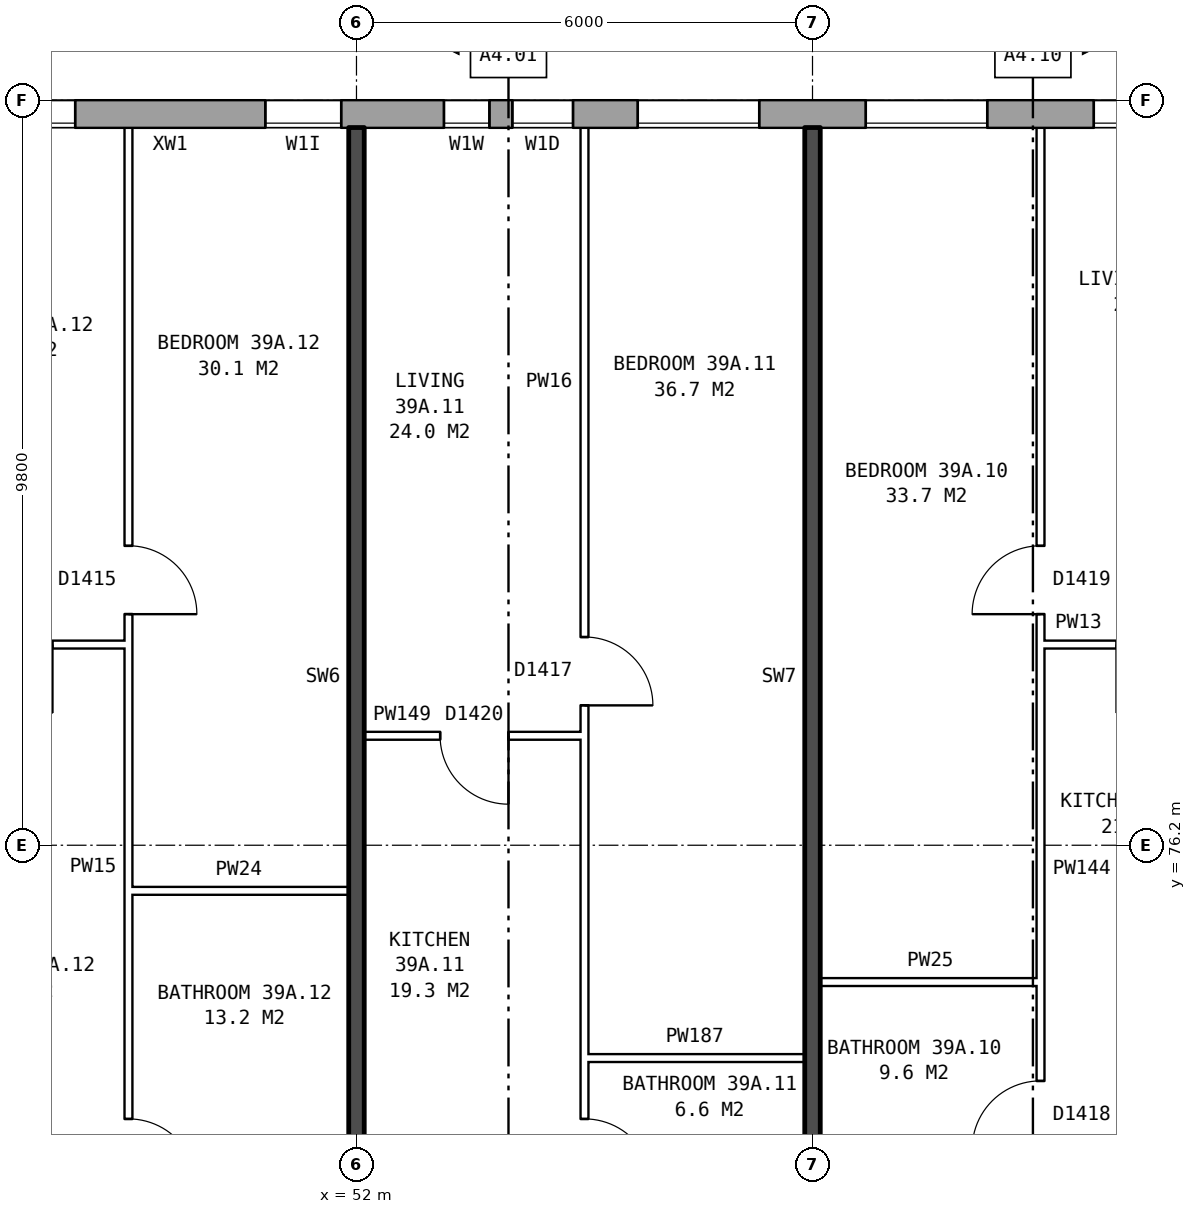
"""IFC4 building model, lengths in metres.
Left out: names, types, materials, properties, quantities, classifications, styles, units other than length and angle.
Written with IfcOpenShell. Run it as: python <this file> out.ifc"""

import sys

from ifc_helpers import new_model, si_unit, direction, frame, frame_2d, origin, place, context, subcontext, project, spatial, rectangle, extrude, element, fill, save


model = new_model("IFC4")
c1 = context("Model", 3, precision=1e-05, world=origin(), true_north=direction((0.0, 1.0)))
c2 = subcontext(c1, "Body", "Model", "MODEL_VIEW")
j1 = project(units=[si_unit("LENGTHUNIT", "METRE"), si_unit("PLANEANGLEUNIT", "RADIAN")], contexts=[c1])
p1 = place(None, origin())
s1 = spatial("IfcSite", under=j1, at=p1, CompositionType="ELEMENT")
p2 = place(p1, origin())
s2 = spatial("IfcBuilding", under=s1, at=p2, CompositionType="ELEMENT")
p3 = place(p2, frame((0.0, 0.0, 139.2)))
s3 = spatial("IfcBuildingStorey", under=s2, at=p3, CompositionType="ELEMENT", Elevation=139.2)
p4 = place(p3, frame((72.925, 85.82, 0.0), z_axis=(0.0, 0.0, 1.0), x_axis=(-1.0, 0.0, 0.0)))
e1 = element("IfcWall", 1, at=p4, inside=s3, PredefinedType="STANDARD", context=c2, shape_type="SweptSolid", body=[
    extrude(rectangle(XDim=43.101, YDim=0.36, at=frame_2d((21.55, 0.0))), origin(), (0.0, 0.0, 1.0), 2.85),
])
p5 = place(p4, frame((0.625, 0.0, 0.8)))
e2 = element("IfcOpeningElement", 2, at=p5, cuts=e1, PredefinedType="OPENING", context=c2, shape_type="SweptSolid", body=[
    extrude(rectangle(XDim=1.6, YDim=1.8, at=frame_2d((0.8, 0.9))), frame((0.0, 0.19, 0.0), z_axis=(0.0, -1.0, 0.0), x_axis=(1.0, 0.0, 0.0)), (0.0, 0.0, 1.0), 0.38),
])
p6 = place(p4, frame((3.625, 0.0, 0.8)))
e3 = element("IfcOpeningElement", 3, at=p6, cuts=e1, PredefinedType="OPENING", context=c2, shape_type="SweptSolid", body=[
    extrude(rectangle(XDim=1.6, YDim=1.8, at=frame_2d((0.8, 0.9))), frame((0.0, 0.19, 0.0), z_axis=(0.0, -1.0, 0.0), x_axis=(1.0, 0.0, 0.0)), (0.0, 0.0, 1.0), 0.38),
])
p7 = place(p4, frame((6.625, 0.0, 0.8)))
e4 = element("IfcOpeningElement", 4, at=p7, cuts=e1, PredefinedType="OPENING", context=c2, shape_type="SweptSolid", body=[
    extrude(rectangle(XDim=1.6, YDim=1.8, at=frame_2d((0.8, 0.9))), frame((0.0, 0.19, 0.0), z_axis=(0.0, -1.0, 0.0), x_axis=(1.0, 0.0, 0.0)), (0.0, 0.0, 1.0), 0.38),
])
p8 = place(p4, frame((9.625, 0.0, 0.8)))
e5 = element("IfcOpeningElement", 5, at=p8, cuts=e1, PredefinedType="OPENING", context=c2, shape_type="SweptSolid", body=[
    extrude(rectangle(XDim=1.6, YDim=1.8, at=frame_2d((0.8, 0.9))), frame((0.0, 0.19, 0.0), z_axis=(0.0, -1.0, 0.0), x_axis=(1.0, 0.0, 0.0)), (0.0, 0.0, 1.0), 0.38),
])
p9 = place(p4, frame((12.625, 0.0, 0.8)))
e6 = element("IfcOpeningElement", 6, at=p9, cuts=e1, PredefinedType="OPENING", context=c2, shape_type="SweptSolid", body=[
    extrude(rectangle(XDim=1.6, YDim=1.8, at=frame_2d((0.8, 0.9))), frame((0.0, 0.19, 0.0), z_axis=(0.0, -1.0, 0.0), x_axis=(1.0, 0.0, 0.0)), (0.0, 0.0, 1.0), 0.38),
])
p10 = place(p4, frame((15.625, 0.0, 0.8)))
e7 = element("IfcOpeningElement", 7, at=p10, cuts=e1, PredefinedType="OPENING", context=c2, shape_type="SweptSolid", body=[
    extrude(rectangle(XDim=1.6, YDim=1.8, at=frame_2d((0.8, 0.9))), frame((0.0, 0.19, 0.0), z_axis=(0.0, -1.0, 0.0), x_axis=(1.0, 0.0, 0.0)), (0.0, 0.0, 1.0), 0.38),
])
p11 = place(p4, frame((18.075, 0.0, 0.8)))
e8 = element("IfcOpeningElement", 8, at=p11, cuts=e1, PredefinedType="OPENING", context=c2, shape_type="SweptSolid", body=[
    extrude(rectangle(XDim=0.8, YDim=1.8, at=frame_2d((0.4, 0.9))), frame((0.0, 0.19, 0.0), z_axis=(0.0, -1.0, 0.0), x_axis=(1.0, 0.0, 0.0)), (0.0, 0.0, 1.0), 0.38),
])
p12 = place(p4, frame((21.125, 0.0, 0.15)))
e9 = element("IfcOpeningElement", 9, at=p12, cuts=e1, PredefinedType="OPENING", context=c2, shape_type="SweptSolid", body=[
    extrude(rectangle(XDim=1.0, YDim=1.5, at=frame_2d((0.5, 0.75))), frame((0.0, 0.19, 0.0), z_axis=(0.0, -1.0, 0.0), x_axis=(1.0, 0.0, 0.0)), (0.0, 0.0, 1.0), 0.38),
])
p13 = place(p4, frame((24.625, 0.0, 0.8)))
e10 = element("IfcOpeningElement", 10, at=p13, cuts=e1, PredefinedType="OPENING", context=c2, shape_type="SweptSolid", body=[
    extrude(rectangle(XDim=1.6, YDim=1.8, at=frame_2d((0.8, 0.9))), frame((0.0, 0.19, 0.0), z_axis=(0.0, -1.0, 0.0), x_axis=(1.0, 0.0, 0.0)), (0.0, 0.0, 1.0), 0.38),
])
p14 = place(p4, frame((27.625, 0.0, 0.8)))
e11 = element("IfcOpeningElement", 11, at=p14, cuts=e1, PredefinedType="OPENING", context=c2, shape_type="SweptSolid", body=[
    extrude(rectangle(XDim=1.6, YDim=1.8, at=frame_2d((0.8, 0.9))), frame((0.0, 0.19, 0.0), z_axis=(0.0, -1.0, 0.0), x_axis=(1.0, 0.0, 0.0)), (0.0, 0.0, 1.0), 0.38),
])
p15 = place(p4, frame((30.625, 0.0, 0.8)))
e12 = element("IfcOpeningElement", 12, at=p15, cuts=e1, PredefinedType="OPENING", context=c2, shape_type="SweptSolid", body=[
    extrude(rectangle(XDim=1.6, YDim=1.8, at=frame_2d((0.8, 0.9))), frame((0.0, 0.19, 0.0), z_axis=(0.0, -1.0, 0.0), x_axis=(1.0, 0.0, 0.0)), (0.0, 0.0, 1.0), 0.38),
])
p16 = place(p4, frame((33.625, 0.0, 0.8)))
e13 = element("IfcOpeningElement", 13, at=p16, cuts=e1, PredefinedType="OPENING", context=c2, shape_type="SweptSolid", body=[
    extrude(rectangle(XDim=1.6, YDim=1.8, at=frame_2d((0.8, 0.9))), frame((0.0, 0.19, 0.0), z_axis=(0.0, -1.0, 0.0), x_axis=(1.0, 0.0, 0.0)), (0.0, 0.0, 1.0), 0.38),
])
p17 = place(p4, frame((36.625, 0.0, 0.8)))
e14 = element("IfcOpeningElement", 14, at=p17, cuts=e1, PredefinedType="OPENING", context=c2, shape_type="SweptSolid", body=[
    extrude(rectangle(XDim=1.6, YDim=1.8, at=frame_2d((0.8, 0.9))), frame((0.0, 0.19, 0.0), z_axis=(0.0, -1.0, 0.0), x_axis=(1.0, 0.0, 0.0)), (0.0, 0.0, 1.0), 0.38),
])
p18 = place(p4, frame((39.625, 0.0, 0.8)))
e15 = element("IfcOpeningElement", 15, at=p18, cuts=e1, PredefinedType="OPENING", context=c2, shape_type="SweptSolid", body=[
    extrude(rectangle(XDim=1.6, YDim=1.8, at=frame_2d((0.8, 0.9))), frame((0.0, 0.19, 0.0), z_axis=(0.0, -1.0, 0.0), x_axis=(1.0, 0.0, 0.0)), (0.0, 0.0, 1.0), 0.38),
])
p19 = place(p4, frame((19.175, 0.0, 1.6)))
e16 = element("IfcOpeningElement", 16, at=p19, cuts=e1, PredefinedType="OPENING", context=c2, shape_type="SweptSolid", body=[
    extrude(rectangle(XDim=0.6, YDim=0.9, at=frame_2d((0.3, 0.45))), frame((0.0, 0.19, 0.0), z_axis=(0.0, -1.0, 0.0), x_axis=(1.0, 0.0, 0.0)), (0.0, 0.0, 1.0), 0.38),
])
for number, where, z_axis, x_axis in (
    (17, (55.0, 73.4, 0.0), (0.0, 0.0, 1.0), (1.0, 0.0, 0.0)),
    (18, (58.1, 74.4, 0.0), (0.0, 0.0, 1.0), (1.0, 0.0, 0.0)),
    (19, (49.0, 75.6, 0.0), (0.0, 0.0, 1.0), (1.0, 0.0, 0.0)),
):
    element("IfcWall", number, at=place(p3, frame(where, z_axis=z_axis, x_axis=x_axis)), inside=s3, PredefinedType="PARTITIONING", context=c2, shape_type="SweptSolid", body=[
        extrude(rectangle(XDim=2.9, YDim=0.1, at=frame_2d((1.45, 0.0))), origin(), (0.0, 0.0, 1.0), 2.85),
    ])
p20 = place(p3, frame((52.1, 77.64, 0.0), z_axis=(0.0, 0.0, 1.0), x_axis=(1.0, 0.0, 0.0)))
e20 = element("IfcWall", 20, at=p20, inside=s3, PredefinedType="PARTITIONING", context=c2, shape_type="SweptSolid", body=[
    extrude(rectangle(XDim=2.9, YDim=0.1, at=frame_2d((1.45, 0.0))), origin(), (0.0, 0.0, 1.0), 2.85),
])
p21 = place(p20, frame((1.0, 0.0, 0.0)))
e21 = element("IfcOpeningElement", 21, at=p21, cuts=e20, PredefinedType="OPENING", context=c2, shape_type="SweptSolid", body=[
    extrude(rectangle(XDim=0.9, YDim=2.1, at=frame_2d((0.45, 1.05))), frame((0.0, 0.06, 0.0), z_axis=(0.0, -1.0, 0.0), x_axis=(1.0, 0.0, 0.0)), (0.0, 0.0, 1.0), 0.12),
])
p22 = place(p3, frame((46.1, 78.84, 0.0), z_axis=(0.0, 0.0, 1.0), x_axis=(1.0, 0.0, 0.0)))
e22 = element("IfcWall", 22, at=p22, inside=s3, PredefinedType="PARTITIONING", context=c2, shape_type="SweptSolid", body=[
    extrude(rectangle(XDim=2.9, YDim=0.1, at=frame_2d((1.45, 0.0))), origin(), (0.0, 0.0, 1.0), 2.85),
])
p23 = place(p22, frame((1.0, 0.0, 0.0)))
e23 = element("IfcOpeningElement", 23, at=p23, cuts=e22, PredefinedType="OPENING", context=c2, shape_type="SweptSolid", body=[
    extrude(rectangle(XDim=0.9, YDim=2.1, at=frame_2d((0.45, 1.05))), frame((0.0, 0.06, 0.0), z_axis=(0.0, -1.0, 0.0), x_axis=(1.0, 0.0, 0.0)), (0.0, 0.0, 1.0), 0.12),
])
p24 = place(p3, frame((61.0, 78.84, 0.0), z_axis=(0.0, 0.0, 1.0), x_axis=(1.0, 0.0, 0.0)))
e24 = element("IfcWall", 24, at=p24, inside=s3, PredefinedType="PARTITIONING", context=c2, shape_type="SweptSolid", body=[
    extrude(rectangle(XDim=2.9, YDim=0.1, at=frame_2d((1.45, 0.0))), origin(), (0.0, 0.0, 1.0), 2.85),
])
p25 = place(p24, frame((1.0, 0.0, 0.0)))
e25 = element("IfcOpeningElement", 25, at=p25, cuts=e24, PredefinedType="OPENING", context=c2, shape_type="SweptSolid", body=[
    extrude(rectangle(XDim=0.9, YDim=2.1, at=frame_2d((0.45, 1.05))), frame((0.0, 0.06, 0.0), z_axis=(0.0, -1.0, 0.0), x_axis=(1.0, 0.0, 0.0)), (0.0, 0.0, 1.0), 0.12),
])
p26 = place(p3, frame((49.0, 71.3, 0.0), z_axis=(0.0, 0.0, 1.0), x_axis=(0.0, 1.0, 0.0)))
e26 = element("IfcWall", 26, at=p26, inside=s3, PredefinedType="PARTITIONING", context=c2, shape_type="SweptSolid", body=[
    extrude(rectangle(XDim=14.34, YDim=0.1, at=frame_2d((7.17, 0.0))), origin(), (0.0, 0.0, 1.0), 2.85),
])
p27 = place(p26, frame((7.94, 0.0, 0.0)))
e27 = element("IfcOpeningElement", 27, at=p27, cuts=e26, PredefinedType="OPENING", context=c2, shape_type="SweptSolid", body=[
    extrude(rectangle(XDim=0.9, YDim=2.1, at=frame_2d((0.45, 1.05))), frame((0.0, 0.06, 0.0), z_axis=(0.0, -1.0, 0.0), x_axis=(1.0, 0.0, 0.0)), (0.0, 0.0, 1.0), 0.12),
])
p28 = place(p26, frame((0.4, 0.0, 0.0)))
e28 = element("IfcOpeningElement", 28, at=p28, cuts=e26, PredefinedType="OPENING", context=c2, shape_type="SweptSolid", body=[
    extrude(rectangle(XDim=0.9, YDim=2.1, at=frame_2d((0.45, 1.05))), frame((0.0, 0.06, 0.0), z_axis=(0.0, -1.0, 0.0), x_axis=(1.0, 0.0, 0.0)), (0.0, 0.0, 1.0), 0.12),
])
p29 = place(p3, frame((52.0, 71.2, 0.0), z_axis=(0.0, 0.0, 1.0), x_axis=(0.0, 1.0, 0.0)))
e29 = element("IfcWall", 29, at=p29, inside=s3, PredefinedType="SOLIDWALL", context=c2, shape_type="SweptSolid", body=[
    extrude(rectangle(XDim=14.44, YDim=0.2, at=frame_2d((7.22, 0.0))), origin(), (0.0, 0.0, 1.0), 2.85),
])
p30 = place(p3, frame((55.0, 71.3, 0.0), z_axis=(0.0, 0.0, 1.0), x_axis=(0.0, 1.0, 0.0)))
e30 = element("IfcWall", 30, at=p30, inside=s3, PredefinedType="PARTITIONING", context=c2, shape_type="SweptSolid", body=[
    extrude(rectangle(XDim=14.34, YDim=0.1, at=frame_2d((7.17, 0.0))), origin(), (0.0, 0.0, 1.0), 2.85),
])
p31 = place(p30, frame((6.74, 0.0, 0.0)))
e31 = element("IfcOpeningElement", 31, at=p31, cuts=e30, PredefinedType="OPENING", context=c2, shape_type="SweptSolid", body=[
    extrude(rectangle(XDim=0.9, YDim=2.1, at=frame_2d((0.45, 1.05))), frame((0.0, 0.06, 0.0), z_axis=(0.0, -1.0, 0.0), x_axis=(1.0, 0.0, 0.0)), (0.0, 0.0, 1.0), 0.12),
])
p32 = place(p30, frame((0.4, 0.0, 0.0)))
e32 = element("IfcOpeningElement", 32, at=p32, cuts=e30, PredefinedType="OPENING", context=c2, shape_type="SweptSolid", body=[
    extrude(rectangle(XDim=0.9, YDim=2.1, at=frame_2d((0.45, 1.05))), frame((0.0, 0.06, 0.0), z_axis=(0.0, -1.0, 0.0), x_axis=(1.0, 0.0, 0.0)), (0.0, 0.0, 1.0), 0.12),
])
p33 = place(p3, frame((58.0, 71.2, 0.0), z_axis=(0.0, 0.0, 1.0), x_axis=(0.0, 1.0, 0.0)))
e33 = element("IfcWall", 33, at=p33, inside=s3, PredefinedType="SOLIDWALL", context=c2, shape_type="SweptSolid", body=[
    extrude(rectangle(XDim=14.44, YDim=0.2, at=frame_2d((7.22, 0.0))), origin(), (0.0, 0.0, 1.0), 2.85),
])
p34 = place(p3, frame((61.0, 71.3, 0.0), z_axis=(0.0, 0.0, 1.0), x_axis=(0.0, 1.0, 0.0)))
e34 = element("IfcWall", 34, at=p34, inside=s3, PredefinedType="PARTITIONING", context=c2, shape_type="SweptSolid", body=[
    extrude(rectangle(XDim=14.34, YDim=0.1, at=frame_2d((7.17, 0.0))), origin(), (0.0, 0.0, 1.0), 2.85),
])
p35 = place(p34, frame((7.94, 0.0, 0.0)))
e35 = element("IfcOpeningElement", 35, at=p35, cuts=e34, PredefinedType="OPENING", context=c2, shape_type="SweptSolid", body=[
    extrude(rectangle(XDim=0.9, YDim=2.1, at=frame_2d((0.45, 1.05))), frame((0.0, 0.06, 0.0), z_axis=(0.0, -1.0, 0.0), x_axis=(1.0, 0.0, 0.0)), (0.0, 0.0, 1.0), 0.12),
])
p36 = place(p34, frame((0.9, 0.0, 0.0)))
e36 = element("IfcOpeningElement", 36, at=p36, cuts=e34, PredefinedType="OPENING", context=c2, shape_type="SweptSolid", body=[
    extrude(rectangle(XDim=0.9, YDim=2.1, at=frame_2d((0.45, 1.05))), frame((0.0, 0.06, 0.0), z_axis=(0.0, -1.0, 0.0), x_axis=(1.0, 0.0, 0.0)), (0.0, 0.0, 1.0), 0.12),
])
p37 = place(p8, origin())
e37 = element("IfcWindow", 37, at=p37, inside=s3, PartitioningType="SINGLE_PANEL", PredefinedType="WINDOW", context=c2, shape_type="SweptSolid", body=[
    extrude(rectangle(XDim=1.6, YDim=1.8, at=frame_2d((0.8, 0.9))), frame((0.0, 0.15, 0.0), z_axis=(0.0, -1.0, 0.0), x_axis=(1.0, 0.0, 0.0)), (0.0, 0.0, 1.0), 0.06),
])
fill(e5, e37)
p38 = place(p9, origin())
e38 = element("IfcWindow", 38, at=p38, inside=s3, PartitioningType="SINGLE_PANEL", PredefinedType="WINDOW", context=c2, shape_type="SweptSolid", body=[
    extrude(rectangle(XDim=1.6, YDim=1.8, at=frame_2d((0.8, 0.9))), frame((0.0, 0.15, 0.0), z_axis=(0.0, -1.0, 0.0), x_axis=(1.0, 0.0, 0.0)), (0.0, 0.0, 1.0), 0.06),
])
fill(e6, e38)
p39 = place(p10, origin())
e39 = element("IfcWindow", 39, at=p39, inside=s3, PartitioningType="SINGLE_PANEL", PredefinedType="WINDOW", context=c2, shape_type="SweptSolid", body=[
    extrude(rectangle(XDim=1.6, YDim=1.8, at=frame_2d((0.8, 0.9))), frame((0.0, 0.15, 0.0), z_axis=(0.0, -1.0, 0.0), x_axis=(1.0, 0.0, 0.0)), (0.0, 0.0, 1.0), 0.06),
])
fill(e7, e39)
p40 = place(p11, origin())
e40 = element("IfcWindow", 40, at=p40, inside=s3, PartitioningType="SINGLE_PANEL", PredefinedType="WINDOW", context=c2, shape_type="SweptSolid", body=[
    extrude(rectangle(XDim=0.8, YDim=1.8, at=frame_2d((0.4, 0.9))), frame((0.0, 0.15, 0.0), z_axis=(0.0, -1.0, 0.0), x_axis=(1.0, 0.0, 0.0)), (0.0, 0.0, 1.0), 0.06),
])
fill(e8, e40)
p41 = place(p12, origin())
e41 = element("IfcWindow", 41, at=p41, inside=s3, PartitioningType="SINGLE_PANEL", PredefinedType="WINDOW", context=c2, shape_type="SweptSolid", body=[
    extrude(rectangle(XDim=1.0, YDim=1.5, at=frame_2d((0.5, 0.75))), frame((0.0, 0.15, 0.0), z_axis=(0.0, -1.0, 0.0), x_axis=(1.0, 0.0, 0.0)), (0.0, 0.0, 1.0), 0.06),
])
fill(e9, e41)
p42 = place(p13, origin())
e42 = element("IfcWindow", 42, at=p42, inside=s3, PartitioningType="SINGLE_PANEL", PredefinedType="WINDOW", context=c2, shape_type="SweptSolid", body=[
    extrude(rectangle(XDim=1.6, YDim=1.8, at=frame_2d((0.8, 0.9))), frame((0.0, 0.15, 0.0), z_axis=(0.0, -1.0, 0.0), x_axis=(1.0, 0.0, 0.0)), (0.0, 0.0, 1.0), 0.06),
])
fill(e10, e42)
p43 = place(p35, origin())
e43 = element("IfcDoor", 43, at=p43, inside=s3, OperationType="SINGLE_SWING_LEFT", PredefinedType="DOOR", context=c2, shape_type="SweptSolid", body=[
    extrude(rectangle(XDim=0.9, YDim=2.1, at=frame_2d((0.45, 1.05))), frame((0.0, 0.025, 0.0), z_axis=(0.0, -1.0, 0.0), x_axis=(1.0, 0.0, 0.0)), (0.0, 0.0, 1.0), 0.05),
])
fill(e35, e43)
p44 = place(p36, origin())
e44 = element("IfcDoor", 44, at=p44, inside=s3, OperationType="SINGLE_SWING_LEFT", PredefinedType="DOOR", context=c2, shape_type="SweptSolid", body=[
    extrude(rectangle(XDim=0.9, YDim=2.1, at=frame_2d((0.45, 1.05))), frame((0.0, 0.025, 0.0), z_axis=(0.0, -1.0, 0.0), x_axis=(1.0, 0.0, 0.0)), (0.0, 0.0, 1.0), 0.05),
])
fill(e36, e44)
p45 = place(p31, frame((0.9, 0.0, 0.0), z_axis=(0.0, 0.0, 1.0), x_axis=(-1.0, 0.0, 0.0)))
e45 = element("IfcDoor", 45, at=p45, inside=s3, OperationType="SINGLE_SWING_RIGHT", PredefinedType="DOOR", context=c2, shape_type="SweptSolid", body=[
    extrude(rectangle(XDim=0.9, YDim=2.1, at=frame_2d((0.45, 1.05))), frame((0.0, 0.025, 0.0), z_axis=(0.0, -1.0, 0.0), x_axis=(1.0, 0.0, 0.0)), (0.0, 0.0, 1.0), 0.05),
])
fill(e31, e45)
p46 = place(p21, frame((0.9, 0.0, 0.0), z_axis=(0.0, 0.0, 1.0), x_axis=(-1.0, 0.0, 0.0)))
e46 = element("IfcDoor", 46, at=p46, inside=s3, OperationType="SINGLE_SWING_LEFT", PredefinedType="DOOR", context=c2, shape_type="SweptSolid", body=[
    extrude(rectangle(XDim=0.9, YDim=2.1, at=frame_2d((0.45, 1.05))), frame((0.0, 0.025, 0.0), z_axis=(0.0, -1.0, 0.0), x_axis=(1.0, 0.0, 0.0)), (0.0, 0.0, 1.0), 0.05),
])
fill(e21, e46)
p47 = place(p32, frame((0.9, 0.0, 0.0), z_axis=(0.0, 0.0, 1.0), x_axis=(-1.0, 0.0, 0.0)))
e47 = element("IfcDoor", 47, at=p47, inside=s3, OperationType="SINGLE_SWING_RIGHT", PredefinedType="DOOR", context=c2, shape_type="SweptSolid", body=[
    extrude(rectangle(XDim=0.9, YDim=2.1, at=frame_2d((0.45, 1.05))), frame((0.0, 0.025, 0.0), z_axis=(0.0, -1.0, 0.0), x_axis=(1.0, 0.0, 0.0)), (0.0, 0.0, 1.0), 0.05),
])
fill(e32, e47)
p48 = place(p27, frame((0.9, 0.0, 0.0), z_axis=(0.0, 0.0, 1.0), x_axis=(-1.0, 0.0, 0.0)))
e48 = element("IfcDoor", 48, at=p48, inside=s3, OperationType="SINGLE_SWING_RIGHT", PredefinedType="DOOR", context=c2, shape_type="SweptSolid", body=[
    extrude(rectangle(XDim=0.9, YDim=2.1, at=frame_2d((0.45, 1.05))), frame((0.0, 0.025, 0.0), z_axis=(0.0, -1.0, 0.0), x_axis=(1.0, 0.0, 0.0)), (0.0, 0.0, 1.0), 0.05),
])
fill(e27, e48)
p49 = place(p28, frame((0.9, 0.0, 0.0), z_axis=(0.0, 0.0, 1.0), x_axis=(-1.0, 0.0, 0.0)))
e49 = element("IfcDoor", 49, at=p49, inside=s3, OperationType="SINGLE_SWING_RIGHT", PredefinedType="DOOR", context=c2, shape_type="SweptSolid", body=[
    extrude(rectangle(XDim=0.9, YDim=2.1, at=frame_2d((0.45, 1.05))), frame((0.0, 0.025, 0.0), z_axis=(0.0, -1.0, 0.0), x_axis=(1.0, 0.0, 0.0)), (0.0, 0.0, 1.0), 0.05),
])
fill(e28, e49)
p50 = place(p19, origin())
e50 = element("IfcWindow", 50, at=p50, inside=s3, PartitioningType="SINGLE_PANEL", PredefinedType="WINDOW", context=c2, shape_type="SweptSolid", body=[
    extrude(rectangle(XDim=0.6, YDim=0.9, at=frame_2d((0.3, 0.45))), frame((0.0, 0.15, 0.0), z_axis=(0.0, -1.0, 0.0), x_axis=(1.0, 0.0, 0.0)), (0.0, 0.0, 1.0), 0.06),
])
fill(e16, e50)
save(model, sys.argv[1])
